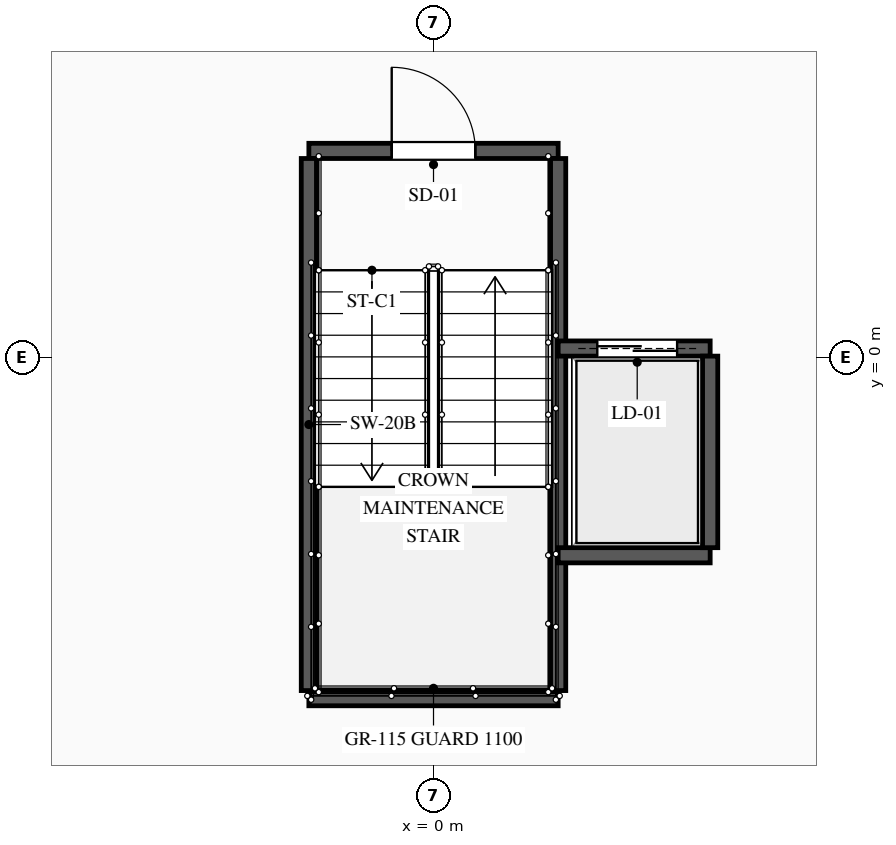
"""IFC4 building model, lengths in metres.
Left out: names, types, materials, properties, quantities, classifications, styles, units other than length and angle.
Written with IfcOpenShell. Run it as: python <this file> out.ifc"""

import sys

from ifc_helpers import new_model, si_unit, direction, frame, frame_2d, origin, place, context, subcontext, project, spatial, rectangle, extrude, element, fill, save


model = new_model("IFC4")
c1 = context("Model", 3, precision=1e-05, world=origin(), true_north=direction((0.0, 1.0)))
c2 = subcontext(c1, "Body", "Model", "MODEL_VIEW")
j1 = project(units=[si_unit("LENGTHUNIT", "METRE"), si_unit("PLANEANGLEUNIT", "RADIAN")], contexts=[c1])
p1 = place(None, origin())
s1 = spatial("IfcSite", under=j1, at=p1, CompositionType="ELEMENT")
p2 = place(p1, origin())
s2 = spatial("IfcBuilding", under=s1, at=p2, CompositionType="ELEMENT")
p3 = place(p2, frame((0.0, 0.0, 289.2)))
s3 = spatial("IfcBuildingStorey", under=s2, at=p3, CompositionType="ELEMENT", Elevation=289.2)
p4 = place(p3, frame((-1.64, 2.72, 0.0), z_axis=(0.0, 0.0, 1.0), x_axis=(1.0, 0.0, 0.0)))
e1 = element("IfcWall", 1, at=p4, inside=s3, PredefinedType="SHEAR", context=c2, shape_type="SweptSolid", body=[
    extrude(rectangle(XDim=3.28, YDim=0.2, at=frame_2d((1.64, 0.0))), origin(), (0.0, 0.0, 1.0), 3.4),
])
p5 = place(p4, frame((1.09, 0.0, 0.0)))
e2 = element("IfcOpeningElement", 2, at=p5, cuts=e1, PredefinedType="OPENING", context=c2, shape_type="SweptSolid", body=[
    extrude(rectangle(XDim=1.1, YDim=2.15, at=frame_2d((0.55, 1.075))), frame((0.0, 0.11, 0.0), z_axis=(0.0, -1.0, 0.0), x_axis=(1.0, 0.0, 0.0)), (0.0, 0.0, 1.0), 0.22),
])
p6 = place(p3, frame((-1.64, -4.48, 0.0), z_axis=(0.0, 0.0, 1.0), x_axis=(1.0, 0.0, 0.0)))
e3 = element("IfcWall", 3, at=p6, inside=s3, PredefinedType="SHEAR", context=c2, shape_type="SweptSolid", body=[
    extrude(rectangle(XDim=3.28, YDim=0.2, at=frame_2d((1.64, 0.0))), origin(), (0.0, 0.0, 1.0), 3.4),
])
for number, where, z_axis, x_axis in (
    (4, (-1.64, -4.38, 0.0), (0.0, 0.0, 1.0), (0.0, 1.0, 0.0)),
    (5, (1.64, -4.38, 0.0), (0.0, 0.0, 1.0), (0.0, 1.0, 0.0)),
):
    element("IfcWall", number, at=place(p3, frame(where, z_axis=z_axis, x_axis=x_axis)), inside=s3, PredefinedType="SHEAR", context=c2, shape_type="SweptSolid", body=[
        extrude(rectangle(XDim=7.0, YDim=0.2, at=frame_2d((3.5, 0.0))), origin(), (0.0, 0.0, 1.0), 3.4),
    ])
p7 = place(p3, frame((1.64, 0.12, 0.0), z_axis=(0.0, 0.0, 1.0), x_axis=(1.0, 0.0, 0.0)))
e6 = element("IfcWall", 6, at=p7, inside=s3, PredefinedType="SHEAR", context=c2, shape_type="SweptSolid", body=[
    extrude(rectangle(XDim=2.0, YDim=0.2, at=frame_2d((1.0, 0.0))), origin(), (0.0, 0.0, 1.0), 3.4),
])
p8 = place(p7, frame((0.515, 0.0, 0.0)))
e7 = element("IfcOpeningElement", 7, at=p8, cuts=e6, PredefinedType="OPENING", context=c2, shape_type="SweptSolid", body=[
    extrude(rectangle(XDim=1.05, YDim=2.1, at=frame_2d((0.525, 1.05))), frame((0.0, 0.11, 0.0), z_axis=(0.0, -1.0, 0.0), x_axis=(1.0, 0.0, 0.0)), (0.0, 0.0, 1.0), 0.22),
])
p9 = place(p3, frame((1.64, -2.6, 0.0), z_axis=(0.0, 0.0, 1.0), x_axis=(1.0, 0.0, 0.0)))
e8 = element("IfcWall", 8, at=p9, inside=s3, PredefinedType="SHEAR", context=c2, shape_type="SweptSolid", body=[
    extrude(rectangle(XDim=2.0, YDim=0.2, at=frame_2d((1.0, 0.0))), origin(), (0.0, 0.0, 1.0), 3.4),
])
p10 = place(p3, frame((3.64, -2.5, 0.0), z_axis=(0.0, 0.0, 1.0), x_axis=(0.0, 1.0, 0.0)))
e9 = element("IfcWall", 9, at=p10, inside=s3, PredefinedType="SHEAR", context=c2, shape_type="SweptSolid", body=[
    extrude(rectangle(XDim=2.52, YDim=0.2, at=frame_2d((1.26, 0.0))), origin(), (0.0, 0.0, 1.0), 3.4),
])
p11 = place(p5, origin())
e10 = element("IfcDoor", 10, at=p11, inside=s3, OperationType="SINGLE_SWING_LEFT", PredefinedType="DOOR", context=c2, shape_type="SweptSolid", body=[
    extrude(rectangle(XDim=1.1, YDim=2.15, at=frame_2d((0.55, 1.075))), frame((0.0, 0.025, 0.0), z_axis=(0.0, -1.0, 0.0), x_axis=(1.0, 0.0, 0.0)), (0.0, 0.0, 1.0), 0.05),
])
fill(e2, e10)
p12 = place(p8, origin())
e11 = element("IfcDoor", 11, at=p12, inside=s3, OperationType="DOUBLE_DOOR_SLIDING", PredefinedType="DOOR", context=c2, shape_type="SweptSolid", body=[
    extrude(rectangle(XDim=1.05, YDim=2.1, at=frame_2d((0.525, 1.05))), frame((0.0, 0.025, 0.0), z_axis=(0.0, -1.0, 0.0), x_axis=(1.0, 0.0, 0.0)), (0.0, 0.0, 1.0), 0.05),
])
fill(e7, e11)
save(model, sys.argv[1])
